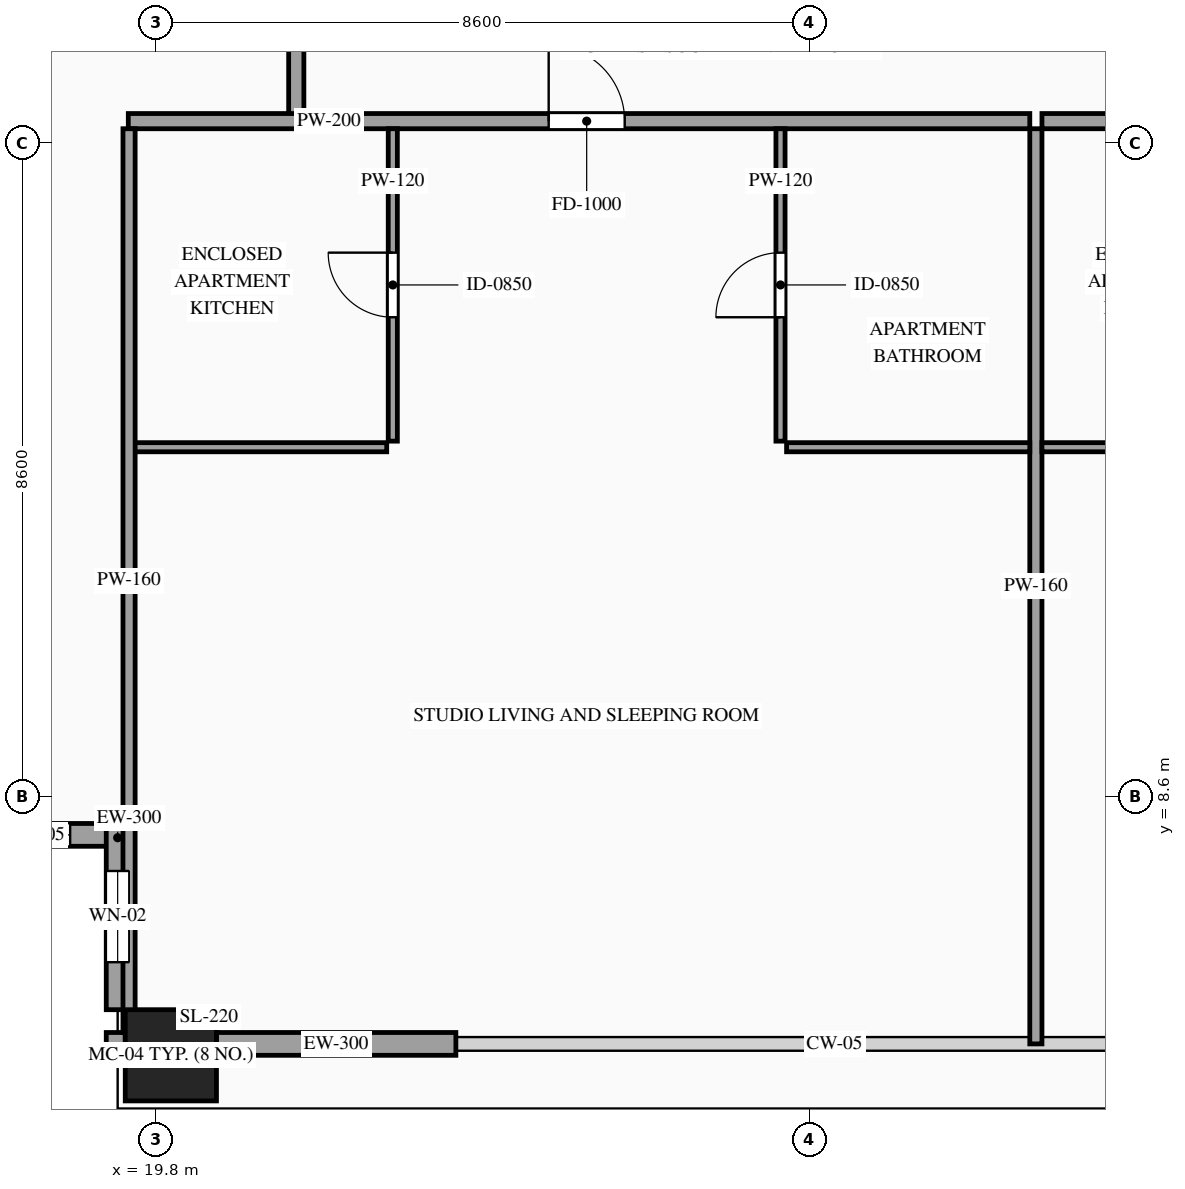
"""IFC4 building model, lengths in metres.
Left out: names, types, materials, properties, quantities, classifications, styles, units other than length and angle.
Written with IfcOpenShell. Run it as: python <this file> out.ifc"""

import sys

from ifc_helpers import new_model, si_unit, direction, frame, frame_2d, origin, origin_2d, place, context, subcontext, project, spatial, rectangle, hollow_rectangle, extrude, source, transform, mapped, element, fill, save


model = new_model("IFC4")
c1 = context("Model", 3, precision=1e-05, world=origin(), true_north=direction((0.0, 1.0)))
c2 = subcontext(c1, "Body", "Model", "MODEL_VIEW")
j1 = project(units=[si_unit("LENGTHUNIT", "METRE"), si_unit("PLANEANGLEUNIT", "RADIAN")], contexts=[c1])
p1 = place(None, origin())
s1 = spatial("IfcSite", under=j1, at=p1, CompositionType="ELEMENT")
p2 = place(p1, origin())
s2 = spatial("IfcBuilding", under=s1, at=p2, CompositionType="ELEMENT")
p3 = place(p2, frame((0.0, 0.0, 271.6)))
s3 = spatial("IfcBuildingStorey", under=s2, at=p3, CompositionType="ELEMENT", Elevation=271.6)
m1 = source(origin(), c2, "Body", "SweptSolid", [
    extrude(hollow_rectangle(XDim=1.2, YDim=1.2, WallThickness=0.055, at=origin_2d()), origin(), (0.0, 0.0, 1.0), 3.5),
])
p4 = place(p3, frame((20.0, 5.2, 0.0), z_axis=(0.0, 0.0, 1.0), x_axis=(1.0, 0.0, 0.0)))
e1 = element("IfcColumn", 1, at=p4, inside=s3, PredefinedType="COLUMN", context=c2, shape_type="MappedRepresentation", body=[
    mapped(m1, transform((0.0, 0.0, 0.0), scale=1.0)),
])
p5 = place(p3, frame((17.0, 8.1, 0.0), z_axis=(0.0, 0.0, 1.0), x_axis=(1.0, 0.0, 0.0)))
e2 = element("IfcWall", 2, at=p5, inside=s3, PredefinedType="SOLIDWALL", context=c2, shape_type="SweptSolid", body=[
    extrude(rectangle(XDim=2.45, YDim=0.3, at=frame_2d((1.225, 0.0))), origin(), (0.0, 0.0, 1.0), 3.28),
])
p6 = place(p5, frame((0.775, 0.0, 0.85)))
e3 = element("IfcOpeningElement", 3, at=p6, cuts=e2, PredefinedType="OPENING", context=c2, shape_type="SweptSolid", body=[
    extrude(rectangle(XDim=0.9, YDim=1.5, at=frame_2d((0.45, 0.75))), frame((0.0, 0.165, 0.0), z_axis=(0.0, -1.0, 0.0), x_axis=(1.0, 0.0, 0.0)), (0.0, 0.0, 1.0), 0.33),
])
p7 = place(p3, frame((19.3, 8.25, 0.0), z_axis=(0.0, 0.0, 1.0), x_axis=(0.0, -1.0, 0.0)))
e4 = element("IfcWall", 4, at=p7, inside=s3, PredefinedType="SOLIDWALL", context=c2, shape_type="SweptSolid", body=[
    extrude(rectangle(XDim=2.45, YDim=0.3, at=frame_2d((1.225, 0.0))), origin(), (0.0, 0.0, 1.0), 3.28),
])
p8 = place(p7, frame((0.625, 0.0, 0.85)))
e5 = element("IfcOpeningElement", 5, at=p8, cuts=e4, PredefinedType="OPENING", context=c2, shape_type="SweptSolid", body=[
    extrude(rectangle(XDim=1.2, YDim=2.1, at=frame_2d((0.6, 1.05))), frame((0.0, 0.165, 0.0), z_axis=(0.0, -1.0, 0.0), x_axis=(1.0, 0.0, 0.0)), (0.0, 0.0, 1.0), 0.33),
])
m2 = source(origin(), c2, "Body", "SweptSolid", [
    extrude(rectangle(XDim=0.25, YDim=0.3, at=frame_2d((0.125, 0.0))), origin(), (0.0, 0.0, 1.0), 3.28),
])
p9 = place(p3, frame((19.15, 5.35, 0.0), z_axis=(0.0, 0.0, 1.0), x_axis=(1.0, 0.0, 0.0)))
e6 = element("IfcWall", 6, at=p9, inside=s3, PredefinedType="SOLIDWALL", context=c2, shape_type="MappedRepresentation", body=[
    mapped(m2, transform((0.0, 0.0, 0.0), scale=1.0)),
])
m3 = source(origin(), c2, "Body", "SweptSolid", [
    extrude(rectangle(XDim=3.15, YDim=0.3, at=frame_2d((1.575, 0.0))), origin(), (0.0, 0.0, 1.0), 2.835),
])
p10 = place(p3, frame((20.6, 5.35, 0.0), z_axis=(0.0, 0.0, 1.0), x_axis=(1.0, 0.0, 0.0)))
e7 = element("IfcWall", 7, at=p10, inside=s3, PredefinedType="SOLIDWALL", context=c2, shape_type="MappedRepresentation", body=[
    mapped(m3, transform((0.0, 0.0, 0.0), scale=1.0)),
])
m4 = source(origin(), c2, "Body", "SweptSolid", [
    extrude(rectangle(XDim=1.7, YDim=0.2, at=frame_2d((0.85, 0.0))), origin(), (0.0, 0.0, 1.0), 3.28),
])
p11 = place(p3, frame((21.65, 17.55, 0.0), z_axis=(0.0, 0.0, 1.0), x_axis=(0.0, 1.0, 0.0)))
e8 = element("IfcWall", 8, at=p11, inside=s3, PredefinedType="PARTITIONING", context=c2, shape_type="MappedRepresentation", body=[
    mapped(m4, transform((0.0, 0.0, 0.0), scale=1.0)),
])
p12 = place(p3, frame((19.44, 17.49, 0.0), z_axis=(0.0, 0.0, 1.0), x_axis=(1.0, 0.0, 0.0)))
e9 = element("IfcWall", 9, at=p12, inside=s3, PredefinedType="PARTITIONING", context=c2, shape_type="SweptSolid", body=[
    extrude(rectangle(XDim=11.861, YDim=0.2, at=frame_2d((5.931, 0.0))), origin(), (0.0, 0.0, 1.0), 3.28),
])
p13 = place(p12, frame((5.531, 0.0, 0.0)))
e10 = element("IfcOpeningElement", 10, at=p13, cuts=e9, PredefinedType="OPENING", context=c2, shape_type="SweptSolid", body=[
    extrude(rectangle(XDim=1.0, YDim=2.2, at=frame_2d((0.5, 1.1))), frame((0.0, 0.115, 0.0), z_axis=(0.0, -1.0, 0.0), x_axis=(1.0, 0.0, 0.0)), (0.0, 0.0, 1.0), 0.23),
])
m5 = source(origin(), c2, "Body", "SweptSolid", [
    extrude(rectangle(XDim=12.04, YDim=0.16, at=frame_2d((6.02, 0.0))), origin(), (0.0, 0.0, 1.0), 3.28),
])
p14 = place(p3, frame((31.381, 5.35, 0.0), z_axis=(0.0, 0.0, 1.0), x_axis=(0.0, 1.0, 0.0)))
e11 = element("IfcWall", 11, at=p14, inside=s3, PredefinedType="PARTITIONING", context=c2, shape_type="MappedRepresentation", body=[
    mapped(m5, transform((0.0, 0.0, 0.0), scale=1.0)),
])
m6 = source(origin(), c2, "Body", "SweptSolid", [
    extrude(rectangle(XDim=3.4, YDim=0.12, at=frame_2d((1.7, 0.0))), origin(), (0.0, 0.0, 1.0), 3.28),
])
p15 = place(p3, frame((19.44, 13.2, 0.0), z_axis=(0.0, 0.0, 1.0), x_axis=(1.0, 0.0, 0.0)))
e12 = element("IfcWall", 12, at=p15, inside=s3, PredefinedType="PARTITIONING", context=c2, shape_type="MappedRepresentation", body=[
    mapped(m6, transform((0.0, 0.0, 0.0), scale=1.0)),
])
p16 = place(p3, frame((22.92, 13.28, 0.0), z_axis=(0.0, 0.0, 1.0), x_axis=(0.0, 1.0, 0.0)))
e13 = element("IfcWall", 13, at=p16, inside=s3, PredefinedType="PARTITIONING", context=c2, shape_type="SweptSolid", body=[
    extrude(rectangle(XDim=4.11, YDim=0.12, at=frame_2d((2.055, 0.0))), origin(), (0.0, 0.0, 1.0), 3.28),
])
p17 = place(p16, frame((1.63, 0.0, 0.0)))
e14 = element("IfcOpeningElement", 14, at=p17, cuts=e13, PredefinedType="OPENING", context=c2, shape_type="SweptSolid", body=[
    extrude(rectangle(XDim=0.85, YDim=2.1, at=frame_2d((0.425, 1.05))), frame((0.0, 0.075, 0.0), z_axis=(0.0, -1.0, 0.0), x_axis=(1.0, 0.0, 0.0)), (0.0, 0.0, 1.0), 0.15),
])
m7 = source(origin(), c2, "Body", "SweptSolid", [
    extrude(rectangle(XDim=3.2, YDim=0.12, at=frame_2d((1.6, 0.0))), origin(), (0.0, 0.0, 1.0), 3.28),
])
p18 = place(p3, frame((28.101, 13.2, 0.0), z_axis=(0.0, 0.0, 1.0), x_axis=(1.0, 0.0, 0.0)))
e15 = element("IfcWall", 15, at=p18, inside=s3, PredefinedType="PARTITIONING", context=c2, shape_type="MappedRepresentation", body=[
    mapped(m7, transform((0.0, 0.0, 0.0), scale=1.0)),
])
p19 = place(p3, frame((28.021, 13.28, 0.0), z_axis=(0.0, 0.0, 1.0), x_axis=(0.0, 1.0, 0.0)))
e16 = element("IfcWall", 16, at=p19, inside=s3, PredefinedType="PARTITIONING", context=c2, shape_type="SweptSolid", body=[
    extrude(rectangle(XDim=4.11, YDim=0.12, at=frame_2d((2.055, 0.0))), origin(), (0.0, 0.0, 1.0), 3.28),
])
p20 = place(p19, frame((1.63, 0.0, 0.0)))
e17 = element("IfcOpeningElement", 17, at=p20, cuts=e16, PredefinedType="OPENING", context=c2, shape_type="SweptSolid", body=[
    extrude(rectangle(XDim=0.85, YDim=2.1, at=frame_2d((0.425, 1.05))), frame((0.0, 0.075, 0.0), z_axis=(0.0, -1.0, 0.0), x_axis=(1.0, 0.0, 0.0)), (0.0, 0.0, 1.0), 0.15),
])
p21 = place(p3, frame((31.461, 17.49, 0.0), z_axis=(0.0, 0.0, 1.0), x_axis=(1.0, 0.0, 0.0)))
e18 = element("IfcWall", 18, at=p21, inside=s3, PredefinedType="PARTITIONING", context=c2, shape_type="SweptSolid", body=[
    extrude(rectangle(XDim=11.429, YDim=0.2, at=frame_2d((5.714, 0.0))), origin(), (0.0, 0.0, 1.0), 3.28),
])
p22 = place(p21, frame((5.314, 0.0, 0.0)))
e19 = element("IfcOpeningElement", 19, at=p22, cuts=e18, PredefinedType="OPENING", context=c2, shape_type="SweptSolid", body=[
    extrude(rectangle(XDim=1.0, YDim=2.2, at=frame_2d((0.5, 1.1))), frame((0.0, 0.115, 0.0), z_axis=(0.0, -1.0, 0.0), x_axis=(1.0, 0.0, 0.0)), (0.0, 0.0, 1.0), 0.23),
])
p23 = place(p3, frame((31.461, 13.2, 0.0), z_axis=(0.0, 0.0, 1.0), x_axis=(1.0, 0.0, 0.0)))
e20 = element("IfcWall", 20, at=p23, inside=s3, PredefinedType="PARTITIONING", context=c2, shape_type="MappedRepresentation", body=[
    mapped(m6, transform((0.0, 0.0, 0.0), scale=1.0)),
])
m8 = source(origin(), c2, "Body", "SweptSolid", [
    extrude(rectangle(XDim=11.89, YDim=0.16, at=frame_2d((5.945, 0.0))), origin(), (0.0, 0.0, 1.0), 3.28),
])
p24 = place(p3, frame((19.45, 5.5, 0.0), z_axis=(0.0, 0.0, 1.0), x_axis=(0.0, 1.0, 0.0)))
e21 = element("IfcWall", 21, at=p24, inside=s3, PredefinedType="PARTITIONING", context=c2, shape_type="MappedRepresentation", body=[
    mapped(m8, transform((0.0, 0.0, 0.0), scale=1.0)),
])
m9 = source(origin(), c2, "Body", "SweptSolid", [
    extrude(rectangle(XDim=0.9, YDim=1.5, at=frame_2d((0.45, 0.75))), frame((0.0, 0.03, 0.0), z_axis=(0.0, -1.0, 0.0), x_axis=(1.0, 0.0, 0.0)), (0.0, 0.0, 1.0), 0.06),
])
p25 = place(p6, origin())
e22 = element("IfcWindow", 22, at=p25, inside=s3, PartitioningType="SINGLE_PANEL", PredefinedType="WINDOW", context=c2, shape_type="MappedRepresentation", body=[
    mapped(m9, transform((0.0, 0.0, 0.0), scale=1.0)),
])
fill(e3, e22)
m10 = source(origin(), c2, "Body", "SweptSolid", [
    extrude(rectangle(XDim=1.2, YDim=2.1, at=frame_2d((0.6, 1.05))), frame((0.0, 0.03, 0.0), z_axis=(0.0, -1.0, 0.0), x_axis=(1.0, 0.0, 0.0)), (0.0, 0.0, 1.0), 0.06),
])
p26 = place(p8, origin())
e23 = element("IfcWindow", 23, at=p26, inside=s3, PartitioningType="SINGLE_PANEL", PredefinedType="WINDOW", context=c2, shape_type="MappedRepresentation", body=[
    mapped(m10, transform((0.0, 0.0, 0.0), scale=1.0)),
])
fill(e5, e23)
m11 = source(origin(), c2, "Body", "SweptSolid", [
    extrude(rectangle(XDim=1.0, YDim=2.2, at=frame_2d((0.5, 1.1))), frame((0.0, 0.025, 0.0), z_axis=(0.0, -1.0, 0.0), x_axis=(1.0, 0.0, 0.0)), (0.0, 0.0, 1.0), 0.05),
])
p27 = place(p13, origin())
e24 = element("IfcDoor", 24, at=p27, inside=s3, OperationType="SINGLE_SWING_LEFT", PredefinedType="DOOR", context=c2, shape_type="MappedRepresentation", body=[
    mapped(m11, transform((0.0, 0.0, 0.0), scale=1.0)),
])
fill(e10, e24)
m12 = source(origin(), c2, "Body", "SweptSolid", [
    extrude(rectangle(XDim=0.85, YDim=2.1, at=frame_2d((0.425, 1.05))), frame((0.0, 0.025, 0.0), z_axis=(0.0, -1.0, 0.0), x_axis=(1.0, 0.0, 0.0)), (0.0, 0.0, 1.0), 0.05),
])
p28 = place(p17, origin())
e25 = element("IfcDoor", 25, at=p28, inside=s3, OperationType="SINGLE_SWING_RIGHT", PredefinedType="DOOR", context=c2, shape_type="MappedRepresentation", body=[
    mapped(m12, transform((0.0, 0.0, 0.0), scale=1.0)),
])
fill(e14, e25)
p29 = place(p20, origin())
e26 = element("IfcDoor", 26, at=p29, inside=s3, OperationType="SINGLE_SWING_LEFT", PredefinedType="DOOR", context=c2, shape_type="MappedRepresentation", body=[
    mapped(m12, transform((0.0, 0.0, 0.0), scale=1.0)),
])
fill(e17, e26)
save(model, sys.argv[1])
